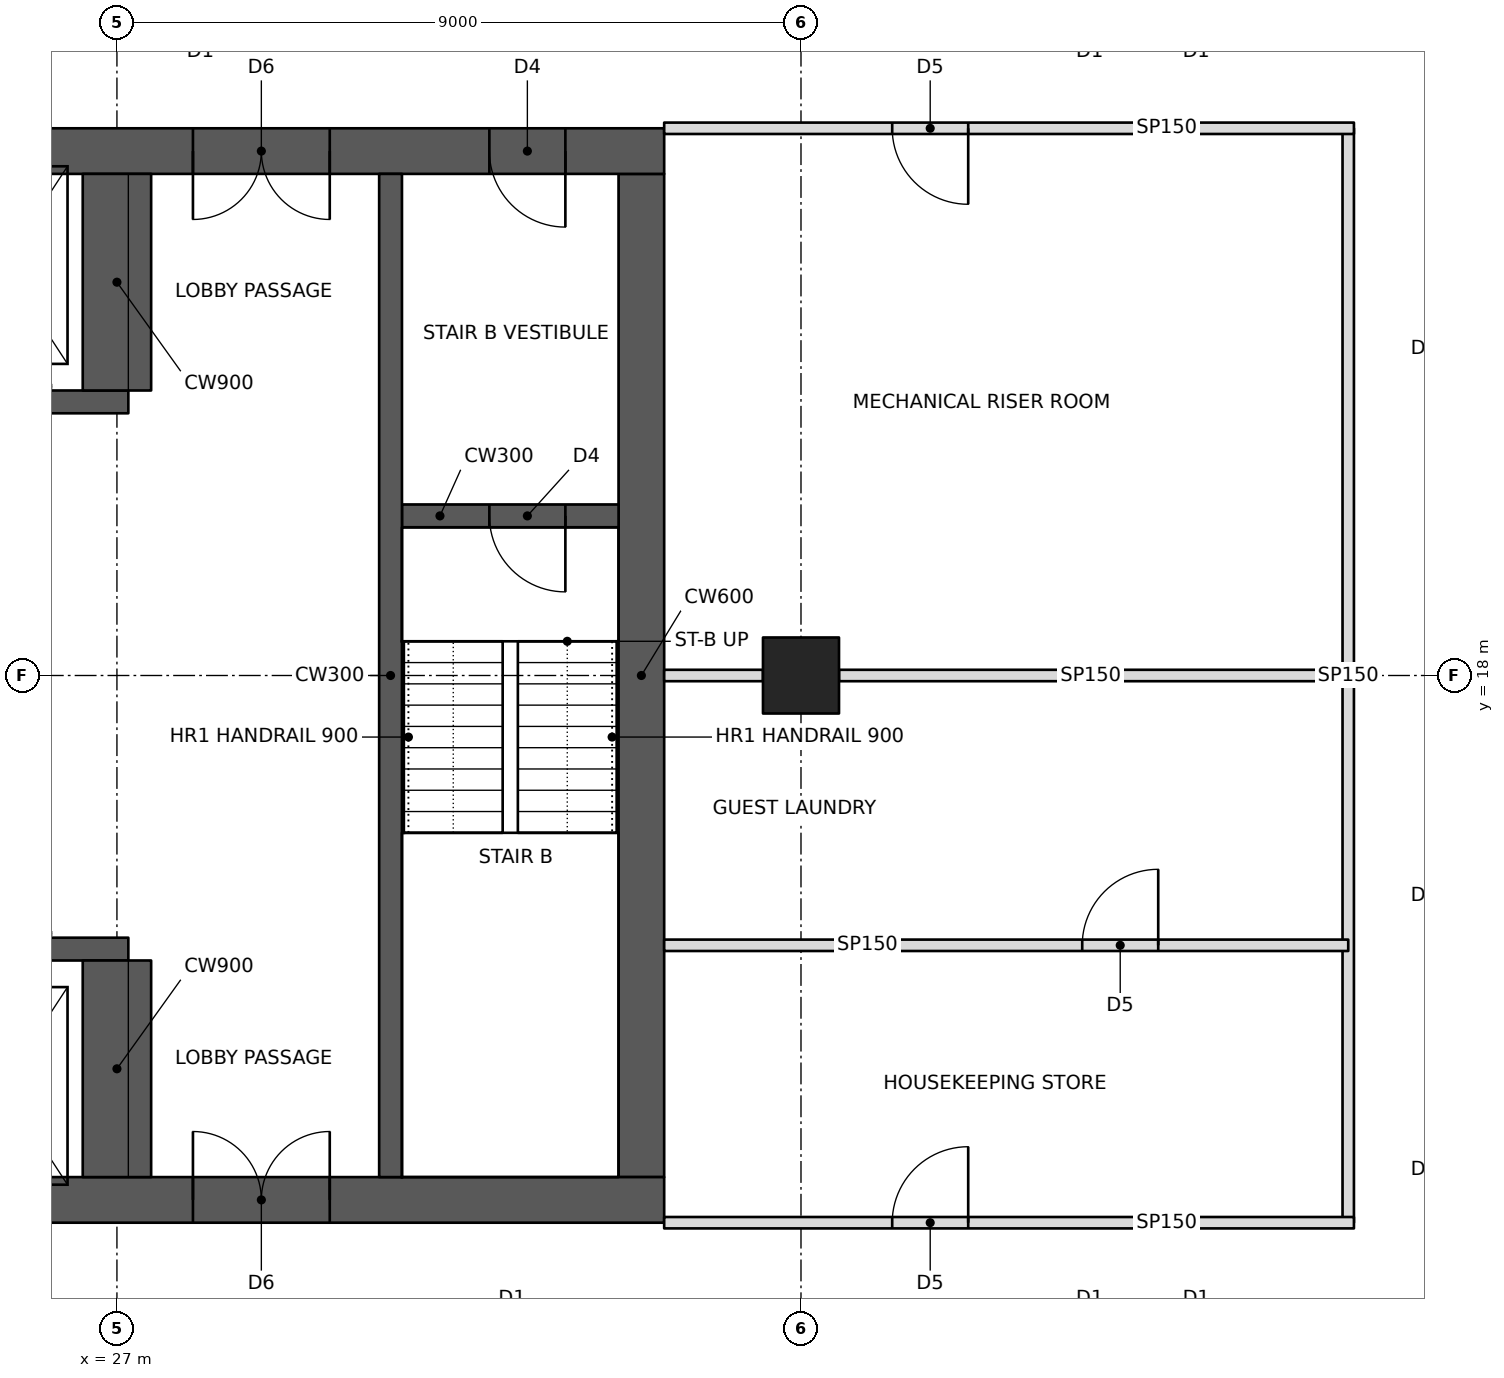
"""IFC4 building model, lengths in metres.
Left out: names, types, materials, properties, quantities, classifications, styles, units other than length and angle.
Written with IfcOpenShell. Run it as: python <this file> out.ifc"""

import sys

from ifc_helpers import new_model, si_unit, direction, frame, frame_2d, origin, origin_2d, place, context, subcontext, project, spatial, rectangle, hollow_rectangle, extrude, element, fill, save


model = new_model("IFC4")
c1 = context("Model", 3, precision=1e-05, world=origin(), true_north=direction((0.0, 1.0)))
c2 = subcontext(c1, "Body", "Model", "MODEL_VIEW")
j1 = project(units=[si_unit("LENGTHUNIT", "METRE"), si_unit("PLANEANGLEUNIT", "RADIAN")], contexts=[c1])
p1 = place(None, origin())
s1 = spatial("IfcSite", under=j1, at=p1, CompositionType="ELEMENT")
p2 = place(p1, origin())
s2 = spatial("IfcBuilding", under=s1, at=p2, CompositionType="ELEMENT")
p3 = place(p2, frame((0.0, 0.0, 85.8)))
s3 = spatial("IfcBuildingStorey", under=s2, at=p3, CompositionType="ELEMENT", Elevation=85.8)
p4 = place(p3, frame((36.0, 18.0, 0.0), z_axis=(0.0, 0.0, 1.0), x_axis=(0.0, 1.0, 0.0)))
e1 = element("IfcColumn", 1, at=p4, inside=s3, PredefinedType="COLUMN", context=c2, shape_type="SweptSolid", body=[
    extrude(hollow_rectangle(XDim=1.0, YDim=1.0, WallThickness=0.1, at=origin_2d()), origin(), (0.0, 0.0, 1.0), 3.4),
])
p5 = place(p3, frame((10.8, 11.1, 0.0), z_axis=(0.0, 0.0, 1.0), x_axis=(1.0, 0.0, 0.0)))
e2 = element("IfcWall", 2, at=p5, inside=s3, PredefinedType="SHEAR", context=c2, shape_type="SweptSolid", body=[
    extrude(rectangle(XDim=23.4, YDim=0.6, at=frame_2d((11.7, 0.0))), origin(), (0.0, 0.0, 1.0), 3.4),
])
p6 = place(p5, frame((1.0, 0.0, 0.0)))
e3 = element("IfcOpeningElement", 3, at=p6, cuts=e2, PredefinedType="OPENING", context=c2, shape_type="SweptSolid", body=[
    extrude(rectangle(XDim=1.0, YDim=2.1, at=frame_2d((0.5, 1.05))), frame((0.0, 0.31, 0.0), z_axis=(0.0, -1.0, 0.0), x_axis=(1.0, 0.0, 0.0)), (0.0, 0.0, 1.0), 0.62),
])
p7 = place(p5, frame((17.2, 0.0, 0.0)))
e4 = element("IfcOpeningElement", 4, at=p7, cuts=e2, PredefinedType="OPENING", context=c2, shape_type="SweptSolid", body=[
    extrude(rectangle(XDim=1.8, YDim=2.1, at=frame_2d((0.9, 1.05))), frame((0.0, 0.31, 0.0), z_axis=(0.0, -1.0, 0.0), x_axis=(1.0, 0.0, 0.0)), (0.0, 0.0, 1.0), 0.62),
])
p8 = place(p3, frame((10.8, 24.9, 0.0), z_axis=(0.0, 0.0, 1.0), x_axis=(1.0, 0.0, 0.0)))
e5 = element("IfcWall", 5, at=p8, inside=s3, PredefinedType="SHEAR", context=c2, shape_type="SweptSolid", body=[
    extrude(rectangle(XDim=23.4, YDim=0.6, at=frame_2d((11.7, 0.0))), origin(), (0.0, 0.0, 1.0), 3.4),
])
p9 = place(p8, frame((17.2, 0.0, 0.0)))
e6 = element("IfcOpeningElement", 6, at=p9, cuts=e5, PredefinedType="OPENING", context=c2, shape_type="SweptSolid", body=[
    extrude(rectangle(XDim=1.8, YDim=2.1, at=frame_2d((0.9, 1.05))), frame((0.0, 0.31, 0.0), z_axis=(0.0, -1.0, 0.0), x_axis=(1.0, 0.0, 0.0)), (0.0, 0.0, 1.0), 0.62),
])
p10 = place(p8, frame((21.1, 0.0, 0.0)))
e7 = element("IfcOpeningElement", 7, at=p10, cuts=e5, PredefinedType="OPENING", context=c2, shape_type="SweptSolid", body=[
    extrude(rectangle(XDim=1.0, YDim=2.1, at=frame_2d((0.5, 1.05))), frame((0.0, 0.31, 0.0), z_axis=(0.0, -1.0, 0.0), x_axis=(1.0, 0.0, 0.0)), (0.0, 0.0, 1.0), 0.62),
])
p11 = place(p3, frame((33.9, 11.4, 0.0), z_axis=(0.0, 0.0, 1.0), x_axis=(0.0, 1.0, 0.0)))
e8 = element("IfcWall", 8, at=p11, inside=s3, PredefinedType="SHEAR", context=c2, shape_type="SweptSolid", body=[
    extrude(rectangle(XDim=13.2, YDim=0.6, at=frame_2d((6.6, 0.0))), origin(), (0.0, 0.0, 1.0), 3.4),
])
p12 = place(p3, frame((18.15, 14.4, 0.0), z_axis=(0.0, 0.0, 1.0), x_axis=(1.0, 0.0, 0.0)))
e9 = element("IfcWall", 9, at=p12, inside=s3, PredefinedType="SHEAR", context=c2, shape_type="SweptSolid", body=[
    extrude(rectangle(XDim=9.0, YDim=0.3, at=frame_2d((4.5, 0.0))), origin(), (0.0, 0.0, 1.0), 3.4),
])
p13 = place(p12, frame((0.8, 0.0, 0.0)))
e10 = element("IfcOpeningElement", 10, at=p13, cuts=e9, PredefinedType="OPENING", context=c2, shape_type="SweptSolid", body=[
    extrude(rectangle(XDim=1.1, YDim=2.1, at=frame_2d((0.55, 1.05))), frame((0.0, 0.16, 0.0), z_axis=(0.0, -1.0, 0.0), x_axis=(1.0, 0.0, 0.0)), (0.0, 0.0, 1.0), 0.32),
])
p14 = place(p12, frame((3.8, 0.0, 0.0)))
e11 = element("IfcOpeningElement", 11, at=p14, cuts=e9, PredefinedType="OPENING", context=c2, shape_type="SweptSolid", body=[
    extrude(rectangle(XDim=1.1, YDim=2.1, at=frame_2d((0.55, 1.05))), frame((0.0, 0.16, 0.0), z_axis=(0.0, -1.0, 0.0), x_axis=(1.0, 0.0, 0.0)), (0.0, 0.0, 1.0), 0.32),
])
p15 = place(p12, frame((6.75, 0.0, 0.0)))
e12 = element("IfcOpeningElement", 12, at=p15, cuts=e9, PredefinedType="OPENING", context=c2, shape_type="SweptSolid", body=[
    extrude(rectangle(XDim=1.2, YDim=2.1, at=frame_2d((0.6, 1.05))), frame((0.0, 0.16, 0.0), z_axis=(0.0, -1.0, 0.0), x_axis=(1.0, 0.0, 0.0)), (0.0, 0.0, 1.0), 0.32),
])
p16 = place(p3, frame((27.0, 11.4, 0.0), z_axis=(0.0, 0.0, 1.0), x_axis=(0.0, 1.0, 0.0)))
e13 = element("IfcWall", 13, at=p16, inside=s3, PredefinedType="SHEAR", context=c2, shape_type="SweptSolid", body=[
    extrude(rectangle(XDim=2.85, YDim=0.9, at=frame_2d((1.425, 0.0))), origin(), (0.0, 0.0, 1.0), 3.4),
])
p17 = place(p3, frame((18.15, 21.6, 0.0), z_axis=(0.0, 0.0, 1.0), x_axis=(1.0, 0.0, 0.0)))
e14 = element("IfcWall", 14, at=p17, inside=s3, PredefinedType="SHEAR", context=c2, shape_type="SweptSolid", body=[
    extrude(rectangle(XDim=9.0, YDim=0.3, at=frame_2d((4.5, 0.0))), origin(), (0.0, 0.0, 1.0), 3.4),
])
p18 = place(p17, frame((6.75, 0.0, 0.0)))
e15 = element("IfcOpeningElement", 15, at=p18, cuts=e14, PredefinedType="OPENING", context=c2, shape_type="SweptSolid", body=[
    extrude(rectangle(XDim=1.2, YDim=2.1, at=frame_2d((0.6, 1.05))), frame((0.0, 0.16, 0.0), z_axis=(0.0, -1.0, 0.0), x_axis=(1.0, 0.0, 0.0)), (0.0, 0.0, 1.0), 0.32),
])
p19 = place(p3, frame((27.0, 21.75, 0.0), z_axis=(0.0, 0.0, 1.0), x_axis=(0.0, 1.0, 0.0)))
e16 = element("IfcWall", 16, at=p19, inside=s3, PredefinedType="SHEAR", context=c2, shape_type="SweptSolid", body=[
    extrude(rectangle(XDim=2.85, YDim=0.9, at=frame_2d((1.425, 0.0))), origin(), (0.0, 0.0, 1.0), 3.4),
])
p20 = place(p3, frame((30.6, 11.4, 0.0), z_axis=(0.0, 0.0, 1.0), x_axis=(0.0, 1.0, 0.0)))
e17 = element("IfcWall", 17, at=p20, inside=s3, PredefinedType="SHEAR", context=c2, shape_type="SweptSolid", body=[
    extrude(rectangle(XDim=13.2, YDim=0.3, at=frame_2d((6.6, 0.0))), origin(), (0.0, 0.0, 1.0), 3.4),
])
p21 = place(p3, frame((30.75, 20.1, 0.0), z_axis=(0.0, 0.0, 1.0), x_axis=(1.0, 0.0, 0.0)))
e18 = element("IfcWall", 18, at=p21, inside=s3, PredefinedType="SHEAR", context=c2, shape_type="SweptSolid", body=[
    extrude(rectangle(XDim=2.85, YDim=0.3, at=frame_2d((1.425, 0.0))), origin(), (0.0, 0.0, 1.0), 3.4),
])
p22 = place(p21, frame((1.15, 0.0, 0.0)))
e19 = element("IfcOpeningElement", 19, at=p22, cuts=e18, PredefinedType="OPENING", context=c2, shape_type="SweptSolid", body=[
    extrude(rectangle(XDim=1.0, YDim=2.1, at=frame_2d((0.5, 1.05))), frame((0.0, 0.16, 0.0), z_axis=(0.0, -1.0, 0.0), x_axis=(1.0, 0.0, 0.0)), (0.0, 0.0, 1.0), 0.32),
])
p23 = place(p3, frame((34.2, 10.8, 0.0), z_axis=(0.0, 0.0, 1.0), x_axis=(1.0, 0.0, 0.0)))
e20 = element("IfcWall", 20, at=p23, inside=s3, PredefinedType="PARTITIONING", context=c2, shape_type="SweptSolid", body=[
    extrude(rectangle(XDim=9.075, YDim=0.15, at=frame_2d((4.538, 0.0))), origin(), (0.0, 0.0, 1.0), 2.21),
])
p24 = place(p23, frame((3.0, 0.0, 0.0)))
e21 = element("IfcOpeningElement", 21, at=p24, cuts=e20, PredefinedType="OPENING", context=c2, shape_type="SweptSolid", body=[
    extrude(rectangle(XDim=1.0, YDim=2.1, at=frame_2d((0.5, 1.05))), frame((0.0, 0.085, 0.0), z_axis=(0.0, -1.0, 0.0), x_axis=(1.0, 0.0, 0.0)), (0.0, 0.0, 1.0), 0.17),
])
p25 = place(p3, frame((34.2, 25.2, 0.0), z_axis=(0.0, 0.0, 1.0), x_axis=(1.0, 0.0, 0.0)))
e22 = element("IfcWall", 22, at=p25, inside=s3, PredefinedType="PARTITIONING", context=c2, shape_type="SweptSolid", body=[
    extrude(rectangle(XDim=9.075, YDim=0.15, at=frame_2d((4.538, 0.0))), origin(), (0.0, 0.0, 1.0), 2.21),
])
p26 = place(p25, frame((3.0, 0.0, 0.0)))
e23 = element("IfcOpeningElement", 23, at=p26, cuts=e22, PredefinedType="OPENING", context=c2, shape_type="SweptSolid", body=[
    extrude(rectangle(XDim=1.0, YDim=2.1, at=frame_2d((0.5, 1.05))), frame((0.0, 0.085, 0.0), z_axis=(0.0, -1.0, 0.0), x_axis=(1.0, 0.0, 0.0)), (0.0, 0.0, 1.0), 0.17),
])
p27 = place(p3, frame((43.2, 10.8, 0.0), z_axis=(0.0, 0.0, 1.0), x_axis=(0.0, 1.0, 0.0)))
e24 = element("IfcWall", 24, at=p27, inside=s3, PredefinedType="PARTITIONING", context=c2, shape_type="SweptSolid", body=[
    extrude(rectangle(XDim=14.4, YDim=0.15, at=frame_2d((7.2, 0.0))), origin(), (0.0, 0.0, 1.0), 2.202),
])
p28 = place(p3, frame((34.2, 18.0, 0.0), z_axis=(0.0, 0.0, 1.0), x_axis=(1.0, 0.0, 0.0)))
e25 = element("IfcWall", 25, at=p28, inside=s3, PredefinedType="PARTITIONING", context=c2, shape_type="SweptSolid", body=[
    extrude(rectangle(XDim=1.3, YDim=0.15, at=frame_2d((0.65, 0.0))), origin(), (0.0, 0.0, 1.0), 3.15),
])
p29 = place(p3, frame((36.5, 18.0, 0.0), z_axis=(0.0, 0.0, 1.0), x_axis=(1.0, 0.0, 0.0)))
e26 = element("IfcWall", 26, at=p29, inside=s3, PredefinedType="PARTITIONING", context=c2, shape_type="SweptSolid", body=[
    extrude(rectangle(XDim=6.625, YDim=0.15, at=frame_2d((3.312, 0.0))), origin(), (0.0, 0.0, 1.0), 2.203),
])
p30 = place(p3, frame((34.2, 14.45, 0.0), z_axis=(0.0, 0.0, 1.0), x_axis=(1.0, 0.0, 0.0)))
e27 = element("IfcWall", 27, at=p30, inside=s3, PredefinedType="PARTITIONING", context=c2, shape_type="SweptSolid", body=[
    extrude(rectangle(XDim=9.0, YDim=0.15, at=frame_2d((4.5, 0.0))), origin(), (0.0, 0.0, 1.0), 2.21),
])
p31 = place(p30, frame((5.5, 0.0, 0.0)))
e28 = element("IfcOpeningElement", 28, at=p31, cuts=e27, PredefinedType="OPENING", context=c2, shape_type="SweptSolid", body=[
    extrude(rectangle(XDim=1.0, YDim=2.1, at=frame_2d((0.5, 1.05))), frame((0.0, 0.085, 0.0), z_axis=(0.0, -1.0, 0.0), x_axis=(1.0, 0.0, 0.0)), (0.0, 0.0, 1.0), 0.17),
])
p32 = place(p31, origin())
e29 = element("IfcDoor", 29, at=p32, inside=s3, OperationType="SINGLE_SWING_RIGHT", PredefinedType="DOOR", context=c2, shape_type="SweptSolid", body=[
    extrude(rectangle(XDim=1.0, YDim=2.1, at=frame_2d((0.5, 1.05))), frame((0.0, 0.025, 0.0), z_axis=(0.0, -1.0, 0.0), x_axis=(1.0, 0.0, 0.0)), (0.0, 0.0, 1.0), 0.05),
])
fill(e28, e29)
p33 = place(p24, origin())
e30 = element("IfcDoor", 30, at=p33, inside=s3, OperationType="SINGLE_SWING_RIGHT", PredefinedType="DOOR", context=c2, shape_type="SweptSolid", body=[
    extrude(rectangle(XDim=1.0, YDim=2.1, at=frame_2d((0.5, 1.05))), frame((0.0, 0.025, 0.0), z_axis=(0.0, -1.0, 0.0), x_axis=(1.0, 0.0, 0.0)), (0.0, 0.0, 1.0), 0.05),
])
fill(e21, e30)
p34 = place(p26, frame((1.0, 0.0, 0.0), z_axis=(0.0, 0.0, 1.0), x_axis=(-1.0, 0.0, 0.0)))
e31 = element("IfcDoor", 31, at=p34, inside=s3, OperationType="SINGLE_SWING_LEFT", PredefinedType="DOOR", context=c2, shape_type="SweptSolid", body=[
    extrude(rectangle(XDim=1.0, YDim=2.1, at=frame_2d((0.5, 1.05))), frame((0.0, 0.025, 0.0), z_axis=(0.0, -1.0, 0.0), x_axis=(1.0, 0.0, 0.0)), (0.0, 0.0, 1.0), 0.05),
])
fill(e23, e31)
p35 = place(p7, origin())
e32 = element("IfcDoor", 32, at=p35, inside=s3, OperationType="DOUBLE_DOOR_SINGLE_SWING", PredefinedType="DOOR", context=c2, shape_type="SweptSolid", body=[
    extrude(rectangle(XDim=1.8, YDim=2.1, at=frame_2d((0.9, 1.05))), frame((0.0, 0.025, 0.0), z_axis=(0.0, -1.0, 0.0), x_axis=(1.0, 0.0, 0.0)), (0.0, 0.0, 1.0), 0.05),
])
fill(e4, e32)
p36 = place(p9, frame((1.8, 0.0, 0.0), z_axis=(0.0, 0.0, 1.0), x_axis=(-1.0, 0.0, 0.0)))
e33 = element("IfcDoor", 33, at=p36, inside=s3, OperationType="DOUBLE_DOOR_SINGLE_SWING", PredefinedType="DOOR", context=c2, shape_type="SweptSolid", body=[
    extrude(rectangle(XDim=1.8, YDim=2.1, at=frame_2d((0.9, 1.05))), frame((0.0, 0.025, 0.0), z_axis=(0.0, -1.0, 0.0), x_axis=(1.0, 0.0, 0.0)), (0.0, 0.0, 1.0), 0.05),
])
fill(e6, e33)
p37 = place(p10, frame((1.0, 0.0, 0.0), z_axis=(0.0, 0.0, 1.0), x_axis=(-1.0, 0.0, 0.0)))
e34 = element("IfcDoor", 34, at=p37, inside=s3, OperationType="SINGLE_SWING_LEFT", PredefinedType="DOOR", context=c2, shape_type="SweptSolid", body=[
    extrude(rectangle(XDim=1.0, YDim=2.1, at=frame_2d((0.5, 1.05))), frame((0.0, 0.025, 0.0), z_axis=(0.0, -1.0, 0.0), x_axis=(1.0, 0.0, 0.0)), (0.0, 0.0, 1.0), 0.05),
])
fill(e7, e34)
p38 = place(p22, frame((1.0, 0.0, 0.0), z_axis=(0.0, 0.0, 1.0), x_axis=(-1.0, 0.0, 0.0)))
e35 = element("IfcDoor", 35, at=p38, inside=s3, OperationType="SINGLE_SWING_LEFT", PredefinedType="DOOR", context=c2, shape_type="SweptSolid", body=[
    extrude(rectangle(XDim=1.0, YDim=2.1, at=frame_2d((0.5, 1.05))), frame((0.0, 0.025, 0.0), z_axis=(0.0, -1.0, 0.0), x_axis=(1.0, 0.0, 0.0)), (0.0, 0.0, 1.0), 0.05),
])
fill(e19, e35)
save(model, sys.argv[1])
